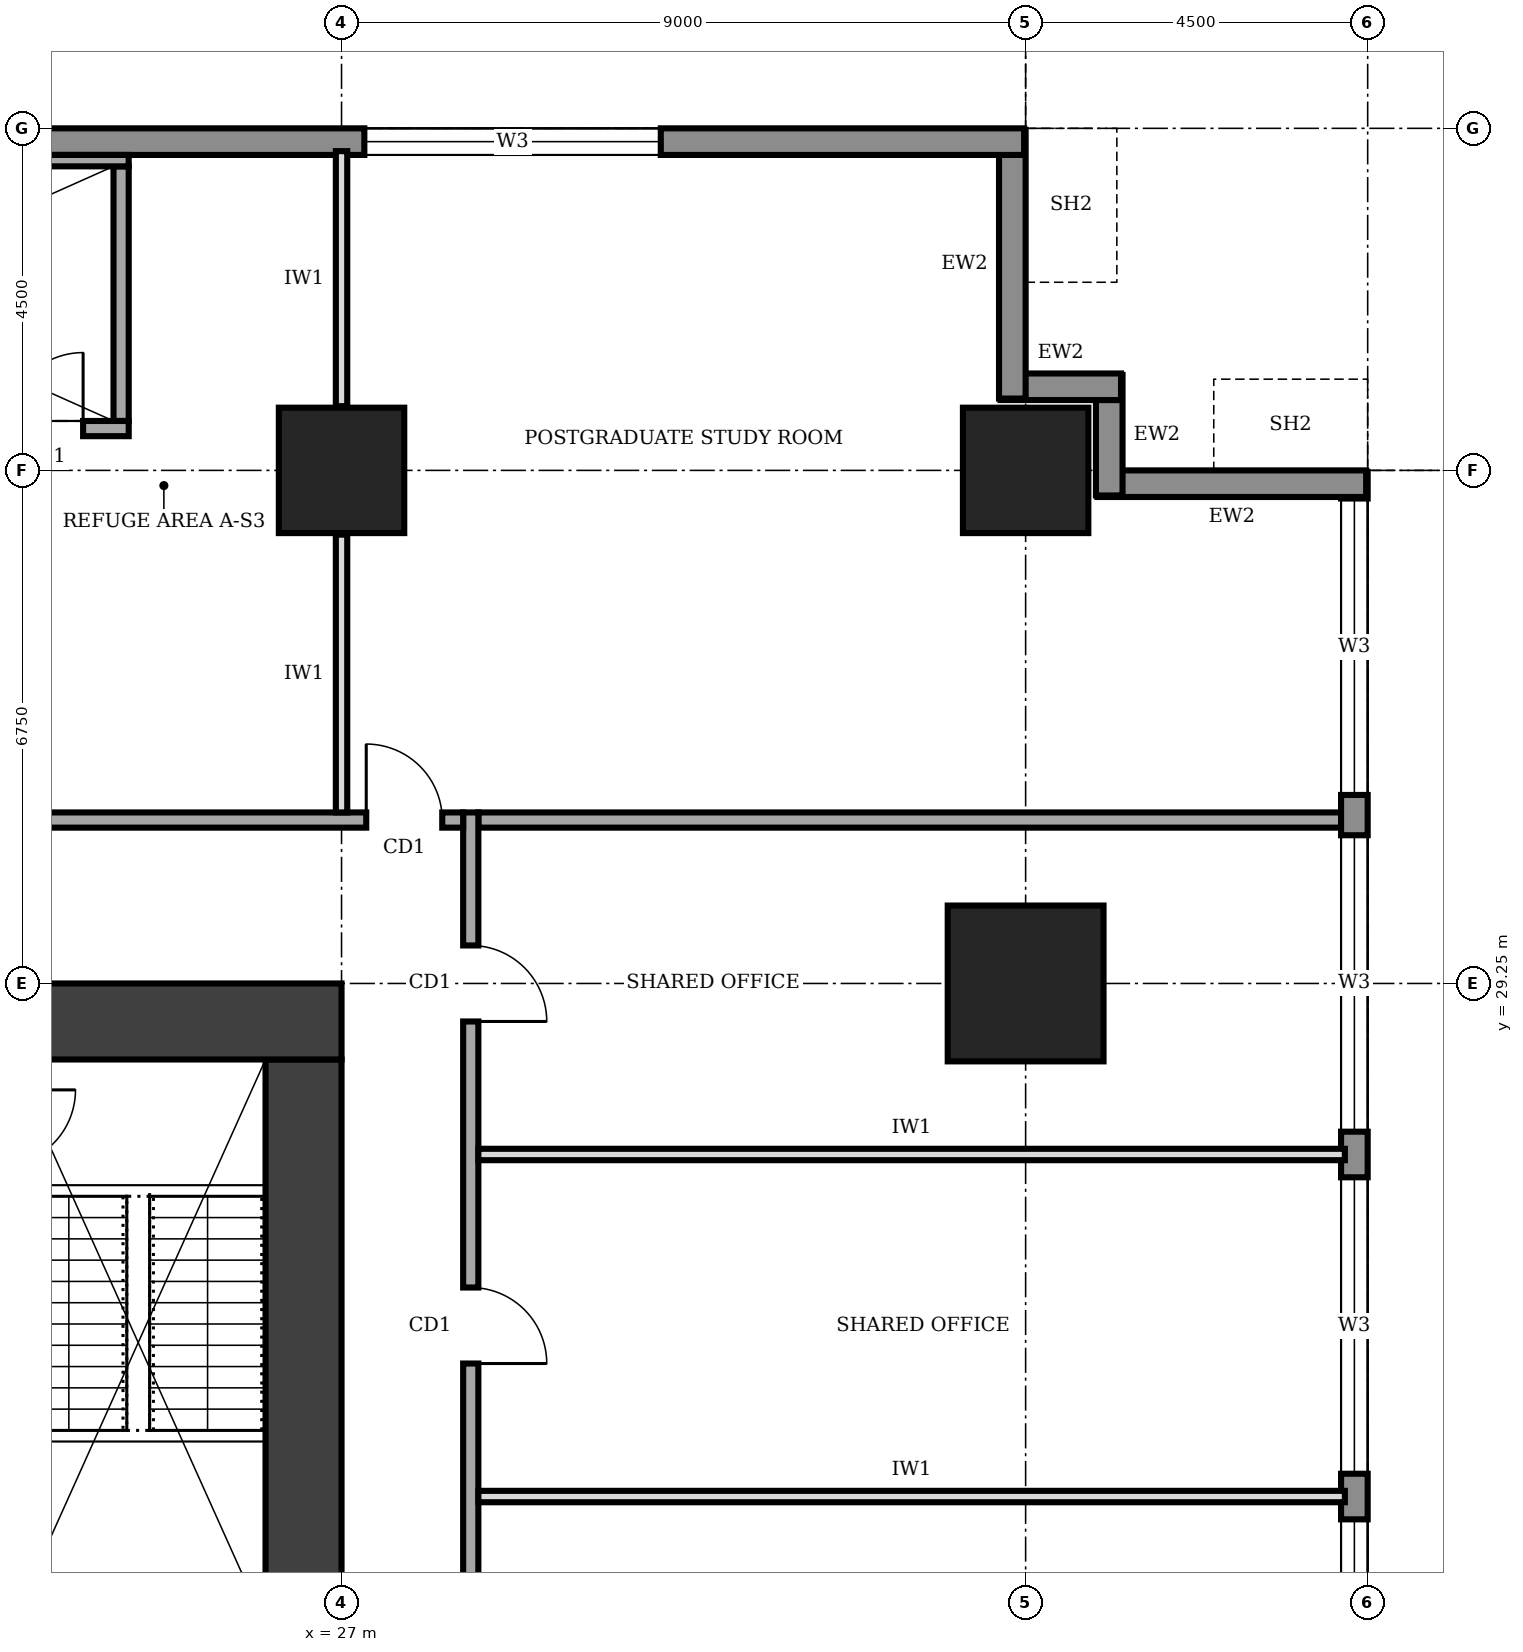
"""IFC4 building model, lengths in metres.
Left out: names, types, materials, properties, quantities, classifications, styles, units other than length and angle.
Written with IfcOpenShell. Run it as: python <this file> out.ifc"""

import sys

from ifc_helpers import new_model, si_unit, direction, frame, frame_2d, origin, origin_2d, place, context, subcontext, project, spatial, rectangle, extrude, element, fill, save


model = new_model("IFC4")
c1 = context("Model", 3, precision=1e-05, world=origin(), true_north=direction((0.0, 1.0)))
c2 = subcontext(c1, "Body", "Model", "MODEL_VIEW")
j1 = project(units=[si_unit("LENGTHUNIT", "METRE"), si_unit("PLANEANGLEUNIT", "RADIAN")], contexts=[c1])
p1 = place(None, origin())
s1 = spatial("IfcSite", under=j1, at=p1, CompositionType="ELEMENT")
p2 = place(p1, origin())
s2 = spatial("IfcBuilding", under=s1, at=p2, CompositionType="ELEMENT")
p3 = place(p2, frame((0.0, 0.0, 181.0)))
s3 = spatial("IfcBuildingStorey", under=s2, at=p3, CompositionType="ELEMENT", Elevation=181.0)
p4 = place(p3, frame((26.5, 12.25, 0.0), z_axis=(0.0, 0.0, 1.0), x_axis=(0.0, 1.0, 0.0)))
e1 = element("IfcWall", 1, at=p4, inside=s3, PredefinedType="SHEAR", context=c2, shape_type="SweptSolid", body=[
    extrude(rectangle(XDim=16.0, YDim=1.0, at=frame_2d((8.0, 0.0))), origin(), (0.0, 0.0, 1.0), 4.0),
])
p5 = place(p3, frame((27.0, 28.75, 0.0), z_axis=(0.0, 0.0, 1.0), x_axis=(-1.0, 0.0, 0.0)))
e2 = element("IfcWall", 2, at=p5, inside=s3, PredefinedType="SHEAR", context=c2, shape_type="SweptSolid", body=[
    extrude(rectangle(XDim=13.5, YDim=1.0, at=frame_2d((6.75, 0.0))), origin(), (0.0, 0.0, 1.0), 4.0),
])
p6 = place(p5, frame((4.75, 0.0, 0.0)))
e3 = element("IfcOpeningElement", 3, at=p6, cuts=e2, PredefinedType="OPENING", context=c2, shape_type="SweptSolid", body=[
    extrude(rectangle(XDim=1.8, YDim=2.1, at=frame_2d((0.9, 1.05))), frame((0.0, 0.51, 0.0), z_axis=(0.0, -1.0, 0.0), x_axis=(1.0, 0.0, 0.0)), (0.0, 0.0, 1.0), 1.02),
])
p7 = place(p3, frame((36.0, 29.25, 0.0), z_axis=(0.0, 0.0, 1.0), x_axis=(1.0, 0.0, 0.0)))
e4 = element("IfcColumn", 4, at=p7, inside=s3, PredefinedType="COLUMN", context=c2, shape_type="SweptSolid", body=[
    extrude(rectangle(XDim=2.05, YDim=2.05, at=origin_2d()), origin(), (0.0, 0.0, 1.0), 4.0),
])
for number, where, z_axis, x_axis in (
    (5, (27.0, 36.0, 0.0), (0.0, 0.0, 1.0), (1.0, 0.0, 0.0)),
    (6, (36.0, 36.0, 0.0), (0.0, 0.0, 1.0), (1.0, 0.0, 0.0)),
):
    element("IfcColumn", number, at=place(p3, frame(where, z_axis=z_axis, x_axis=x_axis)), inside=s3, PredefinedType="COLUMN", context=c2, shape_type="SweptSolid", body=[
        extrude(rectangle(XDim=1.65, YDim=1.65, at=origin_2d()), origin(), (0.0, 0.0, 1.0), 4.0),
    ])
p8 = place(p3, frame((40.325, 4.52, 0.0), z_axis=(0.0, 0.0, 1.0), x_axis=(0.0, 1.0, 0.0)))
e7 = element("IfcWall", 7, at=p8, inside=s3, PredefinedType="STANDARD", context=c2, shape_type="SweptSolid", body=[
    extrude(rectangle(XDim=31.46, YDim=0.35, at=frame_2d((15.73, 0.0))), origin(), (0.0, 0.0, 1.0), 3.75),
])
p9 = place(p8, frame((4.78, 0.0, 0.95)))
e8 = element("IfcOpeningElement", 8, at=p9, cuts=e7, PredefinedType="OPENING", context=c2, shape_type="SweptSolid", body=[
    extrude(rectangle(XDim=3.9, YDim=1.8, at=frame_2d((1.95, 0.9))), frame((0.0, 0.185, 0.0), z_axis=(0.0, -1.0, 0.0), x_axis=(1.0, 0.0, 0.0)), (0.0, 0.0, 1.0), 0.37),
])
p10 = place(p8, frame((9.28, 0.0, 0.95)))
e9 = element("IfcOpeningElement", 9, at=p10, cuts=e7, PredefinedType="OPENING", context=c2, shape_type="SweptSolid", body=[
    extrude(rectangle(XDim=3.9, YDim=1.8, at=frame_2d((1.95, 0.9))), frame((0.0, 0.185, 0.0), z_axis=(0.0, -1.0, 0.0), x_axis=(1.0, 0.0, 0.0)), (0.0, 0.0, 1.0), 0.37),
])
p11 = place(p8, frame((13.78, 0.0, 0.95)))
e10 = element("IfcOpeningElement", 10, at=p11, cuts=e7, PredefinedType="OPENING", context=c2, shape_type="SweptSolid", body=[
    extrude(rectangle(XDim=3.9, YDim=1.8, at=frame_2d((1.95, 0.9))), frame((0.0, 0.185, 0.0), z_axis=(0.0, -1.0, 0.0), x_axis=(1.0, 0.0, 0.0)), (0.0, 0.0, 1.0), 0.37),
])
p12 = place(p8, frame((18.28, 0.0, 0.95)))
e11 = element("IfcOpeningElement", 11, at=p12, cuts=e7, PredefinedType="OPENING", context=c2, shape_type="SweptSolid", body=[
    extrude(rectangle(XDim=3.9, YDim=1.8, at=frame_2d((1.95, 0.9))), frame((0.0, 0.185, 0.0), z_axis=(0.0, -1.0, 0.0), x_axis=(1.0, 0.0, 0.0)), (0.0, 0.0, 1.0), 0.37),
])
p13 = place(p8, frame((22.78, 0.0, 0.95)))
e12 = element("IfcOpeningElement", 12, at=p13, cuts=e7, PredefinedType="OPENING", context=c2, shape_type="SweptSolid", body=[
    extrude(rectangle(XDim=3.9, YDim=1.8, at=frame_2d((1.95, 0.9))), frame((0.0, 0.185, 0.0), z_axis=(0.0, -1.0, 0.0), x_axis=(1.0, 0.0, 0.0)), (0.0, 0.0, 1.0), 0.37),
])
p14 = place(p8, frame((27.21, 0.0, 0.95)))
e13 = element("IfcOpeningElement", 13, at=p14, cuts=e7, PredefinedType="OPENING", context=c2, shape_type="SweptSolid", body=[
    extrude(rectangle(XDim=3.9, YDim=1.8, at=frame_2d((1.95, 0.9))), frame((0.0, 0.185, 0.0), z_axis=(0.0, -1.0, 0.0), x_axis=(1.0, 0.0, 0.0)), (0.0, 0.0, 1.0), 0.37),
])
p15 = place(p3, frame((40.48, 35.825, 0.0), z_axis=(0.0, 0.0, 1.0), x_axis=(-1.0, 0.0, 0.0)))
e14 = element("IfcWall", 14, at=p15, inside=s3, PredefinedType="STANDARD", context=c2, shape_type="SweptSolid", body=[
    extrude(rectangle(XDim=3.535, YDim=0.35, at=frame_2d((1.768, 0.0))), origin(), (0.0, 0.0, 1.0), 2.85),
])
for number, where, z_axis, x_axis in (
    (15, (37.1, 35.67, 0.0), (0.0, 0.0, 1.0), (0.0, 1.0, 0.0)),
    (16, (37.255, 37.1, 0.0), (0.0, 0.0, 1.0), (-1.0, 0.0, 0.0)),
):
    element("IfcWall", number, at=place(p3, frame(where, z_axis=z_axis, x_axis=x_axis)), inside=s3, PredefinedType="STANDARD", context=c2, shape_type="SweptSolid", body=[
        extrude(rectangle(XDim=1.585, YDim=0.35, at=frame_2d((0.792, 0.0))), origin(), (0.0, 0.0, 1.0), 3.75),
    ])
p16 = place(p3, frame((35.825, 36.945, 0.0), z_axis=(0.0, 0.0, 1.0), x_axis=(0.0, 1.0, 0.0)))
e17 = element("IfcWall", 17, at=p16, inside=s3, PredefinedType="STANDARD", context=c2, shape_type="SweptSolid", body=[
    extrude(rectangle(XDim=3.535, YDim=0.35, at=frame_2d((1.768, 0.0))), origin(), (0.0, 0.0, 1.0), 2.85),
])
p17 = place(p3, frame((35.98, 40.325, 0.0), z_axis=(0.0, 0.0, 1.0), x_axis=(-1.0, 0.0, 0.0)))
e18 = element("IfcWall", 18, at=p17, inside=s3, PredefinedType="STANDARD", context=c2, shape_type="SweptSolid", body=[
    extrude(rectangle(XDim=31.46, YDim=0.35, at=frame_2d((15.73, 0.0))), origin(), (0.0, 0.0, 1.0), 3.75),
])
p18 = place(p17, frame((27.21, 0.0, 0.95)))
e19 = element("IfcOpeningElement", 19, at=p18, cuts=e18, PredefinedType="OPENING", context=c2, shape_type="SweptSolid", body=[
    extrude(rectangle(XDim=3.9, YDim=1.8, at=frame_2d((1.95, 0.9))), frame((0.0, 0.185, 0.0), z_axis=(0.0, -1.0, 0.0), x_axis=(1.0, 0.0, 0.0)), (0.0, 0.0, 1.0), 0.37),
])
p19 = place(p17, frame((22.78, 0.0, 0.95)))
e20 = element("IfcOpeningElement", 20, at=p19, cuts=e18, PredefinedType="OPENING", context=c2, shape_type="SweptSolid", body=[
    extrude(rectangle(XDim=3.9, YDim=1.8, at=frame_2d((1.95, 0.9))), frame((0.0, 0.185, 0.0), z_axis=(0.0, -1.0, 0.0), x_axis=(1.0, 0.0, 0.0)), (0.0, 0.0, 1.0), 0.37),
])
p20 = place(p17, frame((4.78, 0.0, 0.95)))
e21 = element("IfcOpeningElement", 21, at=p20, cuts=e18, PredefinedType="OPENING", context=c2, shape_type="SweptSolid", body=[
    extrude(rectangle(XDim=3.9, YDim=1.8, at=frame_2d((1.95, 0.9))), frame((0.0, 0.185, 0.0), z_axis=(0.0, -1.0, 0.0), x_axis=(1.0, 0.0, 0.0)), (0.0, 0.0, 1.0), 0.37),
])
p21 = place(p3, frame((28.7, 9.2, 0.0), z_axis=(0.0, 0.0, 1.0), x_axis=(0.0, 1.0, 0.0)))
e22 = element("IfcWall", 22, at=p21, inside=s3, PredefinedType="SOLIDWALL", context=c2, shape_type="SweptSolid", body=[
    extrude(rectangle(XDim=22.3, YDim=0.2, at=frame_2d((11.15, 0.0))), origin(), (0.0, 0.0, 1.0), 3.75),
])
p22 = place(p21, frame((1.55, 0.0, 0.0)))
e23 = element("IfcOpeningElement", 23, at=p22, cuts=e22, PredefinedType="OPENING", context=c2, shape_type="SweptSolid", body=[
    extrude(rectangle(XDim=1.0, YDim=2.1, at=frame_2d((0.5, 1.05))), frame((0.0, 0.11, 0.0), z_axis=(0.0, -1.0, 0.0), x_axis=(1.0, 0.0, 0.0)), (0.0, 0.0, 1.0), 0.22),
])
p23 = place(p21, frame((6.05, 0.0, 0.0)))
e24 = element("IfcOpeningElement", 24, at=p23, cuts=e22, PredefinedType="OPENING", context=c2, shape_type="SweptSolid", body=[
    extrude(rectangle(XDim=1.0, YDim=2.1, at=frame_2d((0.5, 1.05))), frame((0.0, 0.11, 0.0), z_axis=(0.0, -1.0, 0.0), x_axis=(1.0, 0.0, 0.0)), (0.0, 0.0, 1.0), 0.22),
])
p24 = place(p21, frame((10.55, 0.0, 0.0)))
e25 = element("IfcOpeningElement", 25, at=p24, cuts=e22, PredefinedType="OPENING", context=c2, shape_type="SweptSolid", body=[
    extrude(rectangle(XDim=1.0, YDim=2.1, at=frame_2d((0.5, 1.05))), frame((0.0, 0.11, 0.0), z_axis=(0.0, -1.0, 0.0), x_axis=(1.0, 0.0, 0.0)), (0.0, 0.0, 1.0), 0.22),
])
p25 = place(p21, frame((15.05, 0.0, 0.0)))
e26 = element("IfcOpeningElement", 26, at=p25, cuts=e22, PredefinedType="OPENING", context=c2, shape_type="SweptSolid", body=[
    extrude(rectangle(XDim=1.0, YDim=2.1, at=frame_2d((0.5, 1.05))), frame((0.0, 0.11, 0.0), z_axis=(0.0, -1.0, 0.0), x_axis=(1.0, 0.0, 0.0)), (0.0, 0.0, 1.0), 0.22),
])
p26 = place(p21, frame((19.55, 0.0, 0.0)))
e27 = element("IfcOpeningElement", 27, at=p26, cuts=e22, PredefinedType="OPENING", context=c2, shape_type="SweptSolid", body=[
    extrude(rectangle(XDim=1.0, YDim=2.1, at=frame_2d((0.5, 1.05))), frame((0.0, 0.11, 0.0), z_axis=(0.0, -1.0, 0.0), x_axis=(1.0, 0.0, 0.0)), (0.0, 0.0, 1.0), 0.22),
])
p27 = place(p3, frame((28.6, 31.4, 0.0), z_axis=(0.0, 0.0, 1.0), x_axis=(-1.0, 0.0, 0.0)))
e28 = element("IfcWall", 28, at=p27, inside=s3, PredefinedType="SOLIDWALL", context=c2, shape_type="SweptSolid", body=[
    extrude(rectangle(XDim=16.9, YDim=0.2, at=frame_2d((8.45, 0.0))), origin(), (0.0, 0.0, 1.0), 3.75),
])
p28 = place(p27, frame((15.425, 0.0, 0.0)))
e29 = element("IfcOpeningElement", 29, at=p28, cuts=e28, PredefinedType="OPENING", context=c2, shape_type="SweptSolid", body=[
    extrude(rectangle(XDim=1.0, YDim=2.1, at=frame_2d((0.5, 1.05))), frame((0.0, 0.11, 0.0), z_axis=(0.0, -1.0, 0.0), x_axis=(1.0, 0.0, 0.0)), (0.0, 0.0, 1.0), 0.22),
])
p29 = place(p27, frame((12.35, 0.0, 0.0)))
e30 = element("IfcOpeningElement", 30, at=p29, cuts=e28, PredefinedType="OPENING", context=c2, shape_type="SweptSolid", body=[
    extrude(rectangle(XDim=1.0, YDim=2.1, at=frame_2d((0.5, 1.05))), frame((0.0, 0.11, 0.0), z_axis=(0.0, -1.0, 0.0), x_axis=(1.0, 0.0, 0.0)), (0.0, 0.0, 1.0), 0.22),
])
p30 = place(p27, frame((5.6, 0.0, 0.0)))
e31 = element("IfcOpeningElement", 31, at=p30, cuts=e28, PredefinedType="OPENING", context=c2, shape_type="SweptSolid", body=[
    extrude(rectangle(XDim=1.0, YDim=2.1, at=frame_2d((0.5, 1.05))), frame((0.0, 0.11, 0.0), z_axis=(0.0, -1.0, 0.0), x_axis=(1.0, 0.0, 0.0)), (0.0, 0.0, 1.0), 0.22),
])
p31 = place(p27, frame((0.275, 0.0, 0.0)))
e32 = element("IfcOpeningElement", 32, at=p31, cuts=e28, PredefinedType="OPENING", context=c2, shape_type="SweptSolid", body=[
    extrude(rectangle(XDim=1.0, YDim=2.1, at=frame_2d((0.5, 1.05))), frame((0.0, 0.11, 0.0), z_axis=(0.0, -1.0, 0.0), x_axis=(1.0, 0.0, 0.0)), (0.0, 0.0, 1.0), 0.22),
])
p32 = place(p3, frame((28.8, 31.4, 0.0), z_axis=(0.0, 0.0, 1.0), x_axis=(1.0, 0.0, 0.0)))
e33 = element("IfcWall", 33, at=p32, inside=s3, PredefinedType="SOLIDWALL", context=c2, shape_type="SweptSolid", body=[
    extrude(rectangle(XDim=11.4, YDim=0.2, at=frame_2d((5.7, 0.0))), origin(), (0.0, 0.0, 1.0), 3.75),
])
p33 = place(p3, frame((27.0, 31.5, 0.0), z_axis=(0.0, 0.0, 1.0), x_axis=(0.0, 1.0, 0.0)))
e34 = element("IfcWall", 34, at=p33, inside=s3, PredefinedType="PARTITIONING", context=c2, shape_type="SweptSolid", body=[
    extrude(rectangle(XDim=3.655, YDim=0.15, at=frame_2d((1.828, 0.0))), origin(), (0.0, 0.0, 1.0), 2.85),
])
p34 = place(p3, frame((27.0, 36.845, 0.0), z_axis=(0.0, 0.0, 1.0), x_axis=(0.0, 1.0, 0.0)))
e35 = element("IfcWall", 35, at=p34, inside=s3, PredefinedType="PARTITIONING", context=c2, shape_type="SweptSolid", body=[
    extrude(rectangle(XDim=3.355, YDim=0.15, at=frame_2d((1.677, 0.0))), origin(), (0.0, 0.0, 1.0), 2.85),
])
for number, where, z_axis, x_axis in (
    (36, (28.8, 22.5, 0.0), (0.0, 0.0, 1.0), (1.0, 0.0, 0.0)),
    (37, (28.8, 27.0, 0.0), (0.0, 0.0, 1.0), (1.0, 0.0, 0.0)),
):
    element("IfcWall", number, at=place(p3, frame(where, z_axis=z_axis, x_axis=x_axis)), inside=s3, PredefinedType="PARTITIONING", context=c2, shape_type="SweptSolid", body=[
        extrude(rectangle(XDim=11.4, YDim=0.15, at=frame_2d((5.7, 0.0))), origin(), (0.0, 0.0, 1.0), 3.75),
    ])
p35 = place(p3, frame((16.3, 36.55, 0.0), z_axis=(0.0, 0.0, 1.0), x_axis=(1.0, 0.0, 0.0)))
e38 = element("IfcWall", 38, at=p35, inside=s3, PredefinedType="SOLIDWALL", context=c2, shape_type="SweptSolid", body=[
    extrude(rectangle(XDim=7.9, YDim=0.2, at=frame_2d((3.95, 0.0))), origin(), (0.0, 0.0, 1.0), 3.75),
])
p36 = place(p35, frame((6.3, 0.0, 0.0)))
e39 = element("IfcOpeningElement", 39, at=p36, cuts=e38, PredefinedType="OPENING", context=c2, shape_type="SweptSolid", body=[
    extrude(rectangle(XDim=1.0, YDim=2.1, at=frame_2d((0.5, 1.05))), frame((0.0, 0.11, 0.0), z_axis=(0.0, -1.0, 0.0), x_axis=(1.0, 0.0, 0.0)), (0.0, 0.0, 1.0), 0.22),
])
p37 = place(p3, frame((16.3, 40.075, 0.0), z_axis=(0.0, 0.0, 1.0), x_axis=(1.0, 0.0, 0.0)))
e40 = element("IfcWall", 40, at=p37, inside=s3, PredefinedType="SOLIDWALL", context=c2, shape_type="SweptSolid", body=[
    extrude(rectangle(XDim=7.9, YDim=0.15, at=frame_2d((3.95, 0.0))), origin(), (0.0, 0.0, 1.0), 3.75),
])
p38 = place(p3, frame((24.1, 36.65, 0.0), z_axis=(0.0, 0.0, 1.0), x_axis=(0.0, 1.0, 0.0)))
e41 = element("IfcWall", 41, at=p38, inside=s3, PredefinedType="SOLIDWALL", context=c2, shape_type="SweptSolid", body=[
    extrude(rectangle(XDim=3.35, YDim=0.2, at=frame_2d((1.675, 0.0))), origin(), (0.0, 0.0, 1.0), 3.75),
])
p39 = place(p11, origin())
e42 = element("IfcWindow", 42, at=p39, inside=s3, PartitioningType="SINGLE_PANEL", PredefinedType="WINDOW", context=c2, shape_type="SweptSolid", body=[
    extrude(rectangle(XDim=3.9, YDim=1.8, at=frame_2d((1.95, 0.9))), frame((0.0, 0.03, 0.0), z_axis=(0.0, -1.0, 0.0), x_axis=(1.0, 0.0, 0.0)), (0.0, 0.0, 1.0), 0.06),
])
fill(e10, e42)
p40 = place(p12, origin())
e43 = element("IfcWindow", 43, at=p40, inside=s3, PartitioningType="SINGLE_PANEL", PredefinedType="WINDOW", context=c2, shape_type="SweptSolid", body=[
    extrude(rectangle(XDim=3.9, YDim=1.8, at=frame_2d((1.95, 0.9))), frame((0.0, 0.03, 0.0), z_axis=(0.0, -1.0, 0.0), x_axis=(1.0, 0.0, 0.0)), (0.0, 0.0, 1.0), 0.06),
])
fill(e11, e43)
p41 = place(p13, origin())
e44 = element("IfcWindow", 44, at=p41, inside=s3, PartitioningType="SINGLE_PANEL", PredefinedType="WINDOW", context=c2, shape_type="SweptSolid", body=[
    extrude(rectangle(XDim=3.9, YDim=1.8, at=frame_2d((1.95, 0.9))), frame((0.0, 0.03, 0.0), z_axis=(0.0, -1.0, 0.0), x_axis=(1.0, 0.0, 0.0)), (0.0, 0.0, 1.0), 0.06),
])
fill(e12, e44)
p42 = place(p14, origin())
e45 = element("IfcWindow", 45, at=p42, inside=s3, PartitioningType="SINGLE_PANEL", PredefinedType="WINDOW", context=c2, shape_type="SweptSolid", body=[
    extrude(rectangle(XDim=3.9, YDim=1.8, at=frame_2d((1.95, 0.9))), frame((0.0, 0.03, 0.0), z_axis=(0.0, -1.0, 0.0), x_axis=(1.0, 0.0, 0.0)), (0.0, 0.0, 1.0), 0.06),
])
fill(e13, e45)
p43 = place(p20, origin())
e46 = element("IfcWindow", 46, at=p43, inside=s3, PartitioningType="SINGLE_PANEL", PredefinedType="WINDOW", context=c2, shape_type="SweptSolid", body=[
    extrude(rectangle(XDim=3.9, YDim=1.8, at=frame_2d((1.95, 0.9))), frame((0.0, 0.03, 0.0), z_axis=(0.0, -1.0, 0.0), x_axis=(1.0, 0.0, 0.0)), (0.0, 0.0, 1.0), 0.06),
])
fill(e21, e46)
p44 = place(p25, frame((1.0, 0.0, 0.0), z_axis=(0.0, 0.0, 1.0), x_axis=(-1.0, 0.0, 0.0)))
e47 = element("IfcDoor", 47, at=p44, inside=s3, OperationType="SINGLE_SWING_RIGHT", PredefinedType="DOOR", context=c2, shape_type="SweptSolid", body=[
    extrude(rectangle(XDim=1.0, YDim=2.1, at=frame_2d((0.5, 1.05))), frame((0.0, 0.025, 0.0), z_axis=(0.0, -1.0, 0.0), x_axis=(1.0, 0.0, 0.0)), (0.0, 0.0, 1.0), 0.05),
])
fill(e26, e47)
p45 = place(p26, frame((1.0, 0.0, 0.0), z_axis=(0.0, 0.0, 1.0), x_axis=(-1.0, 0.0, 0.0)))
e48 = element("IfcDoor", 48, at=p45, inside=s3, OperationType="SINGLE_SWING_RIGHT", PredefinedType="DOOR", context=c2, shape_type="SweptSolid", body=[
    extrude(rectangle(XDim=1.0, YDim=2.1, at=frame_2d((0.5, 1.05))), frame((0.0, 0.025, 0.0), z_axis=(0.0, -1.0, 0.0), x_axis=(1.0, 0.0, 0.0)), (0.0, 0.0, 1.0), 0.05),
])
fill(e27, e48)
p46 = place(p31, frame((1.0, 0.0, 0.0), z_axis=(0.0, 0.0, 1.0), x_axis=(-1.0, 0.0, 0.0)))
e49 = element("IfcDoor", 49, at=p46, inside=s3, OperationType="SINGLE_SWING_LEFT", PredefinedType="DOOR", context=c2, shape_type="SweptSolid", body=[
    extrude(rectangle(XDim=1.0, YDim=2.1, at=frame_2d((0.5, 1.05))), frame((0.0, 0.025, 0.0), z_axis=(0.0, -1.0, 0.0), x_axis=(1.0, 0.0, 0.0)), (0.0, 0.0, 1.0), 0.05),
])
fill(e32, e49)
p47 = place(p36, origin())
e50 = element("IfcDoor", 50, at=p47, inside=s3, OperationType="SINGLE_SWING_RIGHT", PredefinedType="DOOR", context=c2, shape_type="SweptSolid", body=[
    extrude(rectangle(XDim=1.0, YDim=2.1, at=frame_2d((0.5, 1.05))), frame((0.0, 0.025, 0.0), z_axis=(0.0, -1.0, 0.0), x_axis=(1.0, 0.0, 0.0)), (0.0, 0.0, 1.0), 0.05),
])
fill(e39, e50)
save(model, sys.argv[1])
